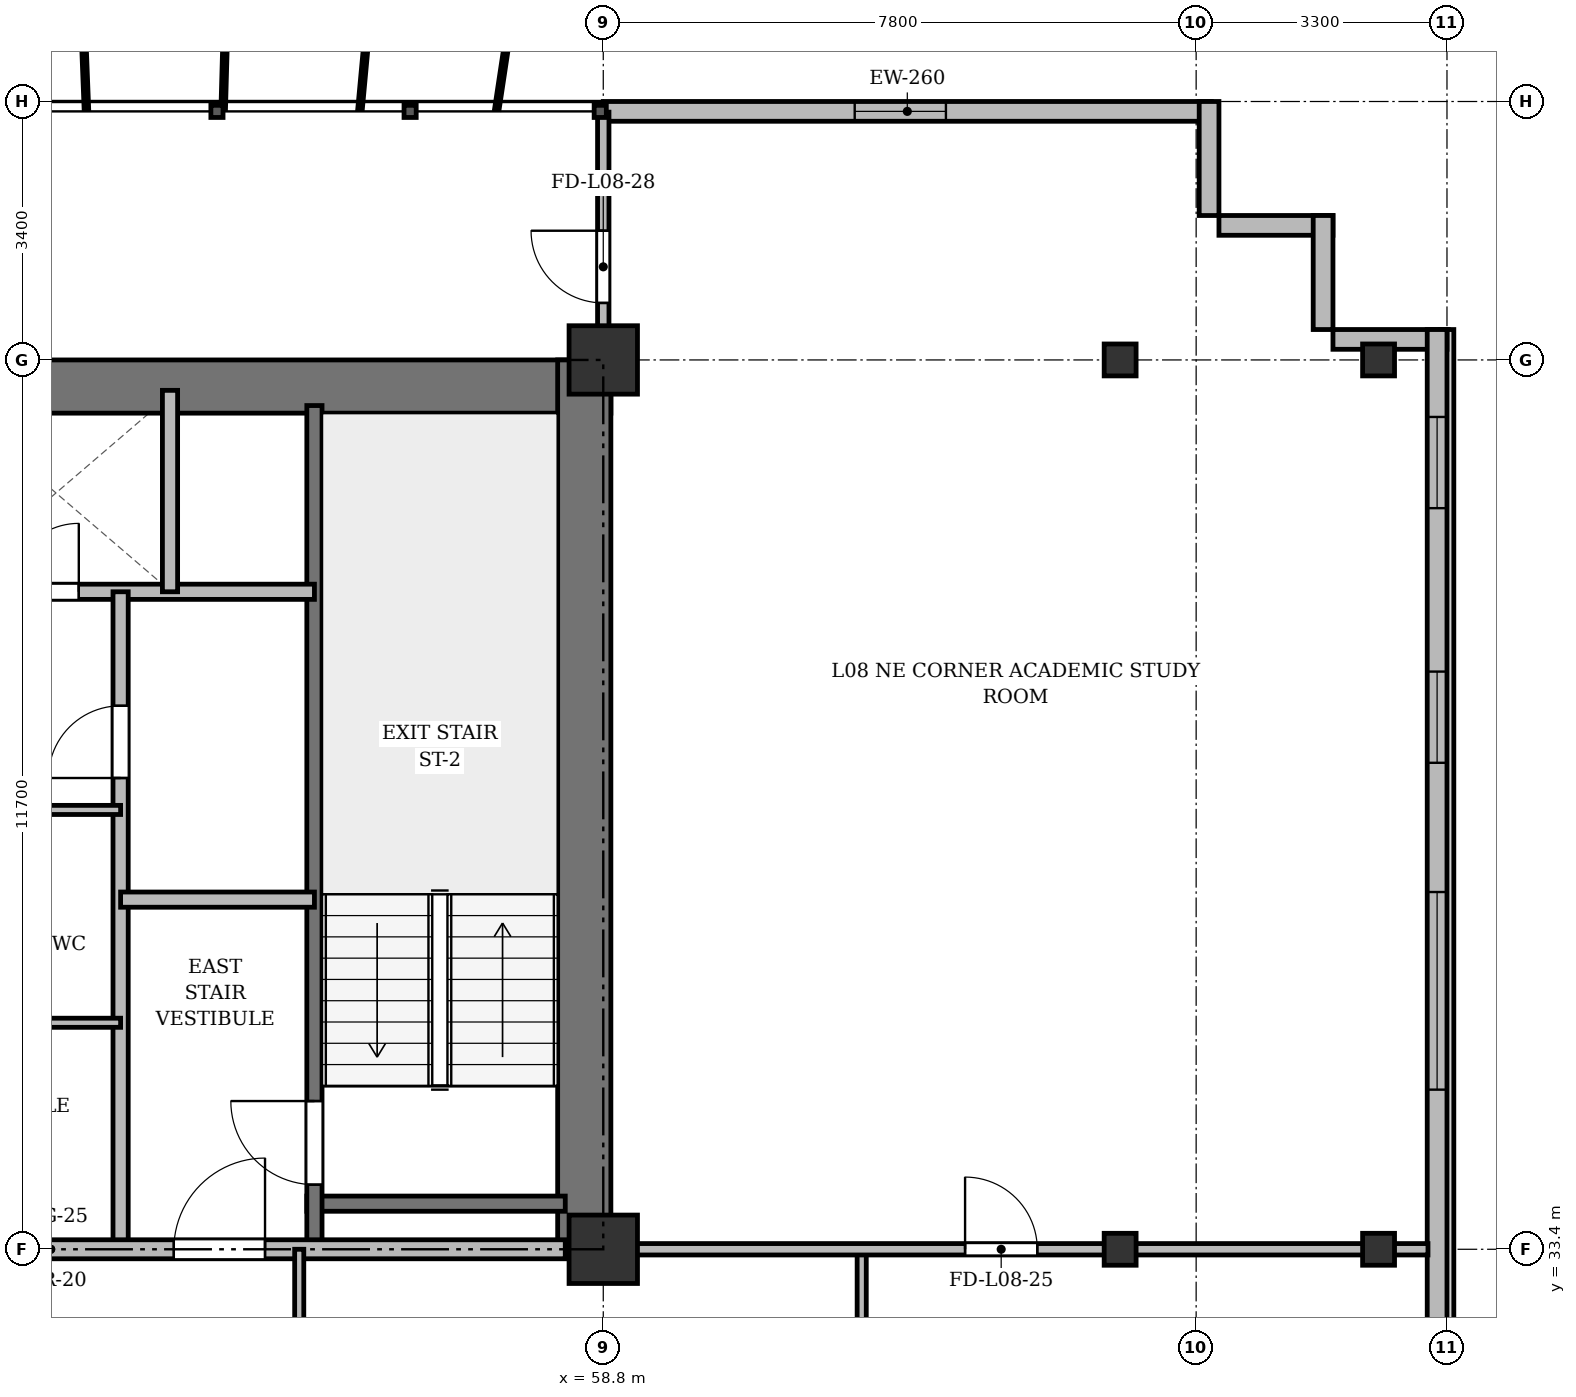
"""IFC4 building model, lengths in metres.
Left out: names, types, materials, properties, quantities, classifications, styles, units other than length and angle.
Written with IfcOpenShell. Run it as: python <this file> out.ifc"""

import sys

from ifc_helpers import new_model, si_unit, direction, frame, frame_2d, origin, origin_2d, place, context, subcontext, project, spatial, rectangle, i_section, extrude, source, transform, mapped, element, fill, save


model = new_model("IFC4")
c1 = context("Model", 3, precision=1e-05, world=origin(), true_north=direction((0.0, 1.0)))
c2 = subcontext(c1, "Body", "Model", "MODEL_VIEW")
j1 = project(units=[si_unit("LENGTHUNIT", "METRE"), si_unit("PLANEANGLEUNIT", "RADIAN")], contexts=[c1])
p1 = place(None, origin())
s1 = spatial("IfcSite", under=j1, at=p1, CompositionType="ELEMENT")
p2 = place(p1, origin())
s2 = spatial("IfcBuilding", under=s1, at=p2, CompositionType="ELEMENT")
p3 = place(p2, frame((0.0, 0.0, 34.3)))
s3 = spatial("IfcBuildingStorey", under=s2, at=p3, CompositionType="ELEMENT", Elevation=34.3)
m1 = source(origin(), c2, "Body", "SweptSolid", [
    extrude(rectangle(XDim=0.9, YDim=0.9, at=origin_2d()), origin(), (0.0, 0.0, 1.0), 3.6),
])
for number, where, z_axis, x_axis in (
    (1, (58.8, 33.4, 0.0), (0.0, 0.0, 1.0), (1.0, 0.0, 0.0)),
    (2, (58.8, 45.1, 0.0), (0.0, 0.0, 1.0), (1.0, 0.0, 0.0)),
):
    element("IfcColumn", number, at=place(p3, frame(where, z_axis=z_axis, x_axis=x_axis)), inside=s3, PredefinedType="COLUMN", context=c2, shape_type="MappedRepresentation", body=[
        mapped(m1, transform((0.0, 0.0, 0.0), x_axis=(1.0, 0.0, 0.0), y_axis=(0.0, 1.0, 0.0), z_axis=(0.0, 0.0, 1.0), scale=1.0)),
    ])
m2 = source(origin(), c2, "Body", "SweptSolid", [
    extrude(i_section(OverallWidth=0.42, OverallDepth=0.42, WebThickness=0.026, FlangeThickness=0.04, at=origin_2d()), origin(), (0.0, 0.0, 1.0), 3.6),
])
for number, where, z_axis, x_axis in (
    (3, (65.6, 33.4, 0.0), (0.0, 0.0, 1.0), (1.0, 0.0, 0.0)),
    (4, (65.6, 45.1, 0.0), (0.0, 0.0, 1.0), (1.0, 0.0, 0.0)),
    (5, (69.0, 33.4, 0.0), (0.0, 0.0, 1.0), (1.0, 0.0, 0.0)),
    (6, (69.0, 45.1, 0.0), (0.0, 0.0, 1.0), (1.0, 0.0, 0.0)),
):
    element("IfcColumn", number, at=place(p3, frame(where, z_axis=z_axis, x_axis=x_axis)), inside=s3, PredefinedType="COLUMN", context=c2, shape_type="MappedRepresentation", body=[
        mapped(m2, transform((0.0, 0.0, 0.0), x_axis=(1.0, 0.0, 0.0), y_axis=(0.0, 1.0, 0.0), z_axis=(0.0, 0.0, 1.0), scale=1.0)),
    ])
p4 = place(p3, frame((58.8, 48.37, 0.0), z_axis=(0.0, 0.0, 1.0), x_axis=(1.0, 0.0, 0.0)))
e7 = element("IfcWall", 7, at=p4, inside=s3, PredefinedType="SOLIDWALL", context=c2, shape_type="SweptSolid", body=[
    extrude(rectangle(XDim=8.0, YDim=0.26, at=frame_2d((4.0, 0.0))), origin(), (0.0, 0.0, 1.0), 3.34),
])
p5 = place(p4, frame((3.308, 0.0, 0.9)))
e8 = element("IfcOpeningElement", 8, at=p5, cuts=e7, PredefinedType="OPENING", context=c2, shape_type="SweptSolid", body=[
    extrude(rectangle(XDim=1.2, YDim=1.65, at=frame_2d((0.6, 0.825))), frame((0.0, 0.14, 0.0), z_axis=(0.0, -1.0, 0.0), x_axis=(1.0, 0.0, 0.0)), (0.0, 0.0, 1.0), 0.28),
])
for number, where, z_axis, x_axis in (
    (9, (66.77, 48.5, 0.0), (0.0, 0.0, 1.0), (0.0, -1.0, 0.0)),
    (10, (66.9, 46.87, 0.0), (0.0, 0.0, 1.0), (1.0, 0.0, 0.0)),
    (11, (68.27, 47.0, 0.0), (0.0, 0.0, 1.0), (0.0, -1.0, 0.0)),
):
    element("IfcWall", number, at=place(p3, frame(where, z_axis=z_axis, x_axis=x_axis)), inside=s3, PredefinedType="SOLIDWALL", context=c2, shape_type="SweptSolid", body=[
        extrude(rectangle(XDim=1.5, YDim=0.26, at=frame_2d((0.75, 0.0))), origin(), (0.0, 0.0, 1.0), 3.34),
    ])
p6 = place(p3, frame((68.4, 45.37, 0.0), z_axis=(0.0, 0.0, 1.0), x_axis=(1.0, 0.0, 0.0)))
e12 = element("IfcWall", 12, at=p6, inside=s3, PredefinedType="SOLIDWALL", context=c2, shape_type="SweptSolid", body=[
    extrude(rectangle(XDim=1.5, YDim=0.26, at=frame_2d((0.75, 0.0))), origin(), (0.0, 0.0, 1.0), 2.69),
])
p7 = place(p3, frame((69.77, 45.5, 0.0), z_axis=(0.0, 0.0, 1.0), x_axis=(0.0, -1.0, 0.0)))
e13 = element("IfcWall", 13, at=p7, inside=s3, PredefinedType="SOLIDWALL", context=c2, shape_type="SweptSolid", body=[
    extrude(rectangle(XDim=39.6, YDim=0.26, at=frame_2d((19.8, 0.0))), origin(), (0.0, 0.0, 1.0), 3.34),
])
p8 = place(p7, frame((36.95, 0.0, 0.92)))
e14 = element("IfcOpeningElement", 14, at=p8, cuts=e13, PredefinedType="OPENING", context=c2, shape_type="SweptSolid", body=[
    extrude(rectangle(XDim=1.2, YDim=1.65, at=frame_2d((0.6, 0.825))), frame((0.0, 0.14, 0.0), z_axis=(0.0, -1.0, 0.0), x_axis=(1.0, 0.0, 0.0)), (0.0, 0.0, 1.0), 0.28),
])
p9 = place(p7, frame((32.8, 0.0, 0.92)))
e15 = element("IfcOpeningElement", 15, at=p9, cuts=e13, PredefinedType="OPENING", context=c2, shape_type="SweptSolid", body=[
    extrude(rectangle(XDim=2.6, YDim=1.9, at=frame_2d((1.3, 0.95))), frame((0.0, 0.14, 0.0), z_axis=(0.0, -1.0, 0.0), x_axis=(1.0, 0.0, 0.0)), (0.0, 0.0, 1.0), 0.28),
])
p10 = place(p7, frame((28.6, 0.0, 0.92)))
e16 = element("IfcOpeningElement", 16, at=p10, cuts=e13, PredefinedType="OPENING", context=c2, shape_type="SweptSolid", body=[
    extrude(rectangle(XDim=2.6, YDim=1.9, at=frame_2d((1.3, 0.95))), frame((0.0, 0.14, 0.0), z_axis=(0.0, -1.0, 0.0), x_axis=(1.0, 0.0, 0.0)), (0.0, 0.0, 1.0), 0.28),
])
p11 = place(p7, frame((7.4, 0.0, 0.92)))
e17 = element("IfcOpeningElement", 17, at=p11, cuts=e13, PredefinedType="OPENING", context=c2, shape_type="SweptSolid", body=[
    extrude(rectangle(XDim=2.6, YDim=1.9, at=frame_2d((1.3, 0.95))), frame((0.0, 0.14, 0.0), z_axis=(0.0, -1.0, 0.0), x_axis=(1.0, 0.0, 0.0)), (0.0, 0.0, 1.0), 0.28),
])
p12 = place(p7, frame((4.5, 0.0, 0.92)))
e18 = element("IfcOpeningElement", 18, at=p12, cuts=e13, PredefinedType="OPENING", context=c2, shape_type="SweptSolid", body=[
    extrude(rectangle(XDim=1.2, YDim=1.65, at=frame_2d((0.6, 0.825))), frame((0.0, 0.14, 0.0), z_axis=(0.0, -1.0, 0.0), x_axis=(1.0, 0.0, 0.0)), (0.0, 0.0, 1.0), 0.28),
])
p13 = place(p7, frame((1.15, 0.0, 0.92)))
e19 = element("IfcOpeningElement", 19, at=p13, cuts=e13, PredefinedType="OPENING", context=c2, shape_type="SweptSolid", body=[
    extrude(rectangle(XDim=1.2, YDim=1.65, at=frame_2d((0.6, 0.825))), frame((0.0, 0.14, 0.0), z_axis=(0.0, -1.0, 0.0), x_axis=(1.0, 0.0, 0.0)), (0.0, 0.0, 1.0), 0.28),
])
p14 = place(p3, frame((15.5, 44.75, 0.0), z_axis=(0.0, 0.0, 1.0), x_axis=(1.0, 0.0, 0.0)))
e20 = element("IfcWall", 20, at=p14, inside=s3, PredefinedType="SHEAR", context=c2, shape_type="SweptSolid", body=[
    extrude(rectangle(XDim=43.4, YDim=0.7, at=frame_2d((21.7, 0.0))), origin(), (0.0, 0.0, 1.0), 3.34),
])
p15 = place(p3, frame((58.55, 33.4, 0.0), z_axis=(0.0, 0.0, 1.0), x_axis=(0.0, 1.0, 0.0)))
e21 = element("IfcWall", 21, at=p15, inside=s3, PredefinedType="SHEAR", context=c2, shape_type="SweptSolid", body=[
    extrude(rectangle(XDim=11.7, YDim=0.7, at=frame_2d((5.85, 0.0))), origin(), (0.0, 0.0, 1.0), 3.34),
])
p16 = place(p3, frame((54.9, 34.0, 0.0), z_axis=(0.0, 0.0, 1.0), x_axis=(1.0, 0.0, 0.0)))
e22 = element("IfcWall", 22, at=p16, inside=s3, PredefinedType="SHEAR", context=c2, shape_type="SweptSolid", body=[
    extrude(rectangle(XDim=3.4, YDim=0.2, at=frame_2d((1.7, 0.0))), origin(), (0.0, 0.0, 1.0), 3.34),
])
p17 = place(p3, frame((55.0, 33.4, 0.0), z_axis=(0.0, 0.0, 1.0), x_axis=(0.0, 1.0, 0.0)))
e23 = element("IfcWall", 23, at=p17, inside=s3, PredefinedType="SHEAR", context=c2, shape_type="SweptSolid", body=[
    extrude(rectangle(XDim=11.1, YDim=0.2, at=frame_2d((5.55, 0.0))), origin(), (0.0, 0.0, 1.0), 3.34),
])
p18 = place(p17, frame((0.85, 0.0, 0.0)))
e24 = element("IfcOpeningElement", 24, at=p18, cuts=e23, PredefinedType="OPENING", context=c2, shape_type="SweptSolid", body=[
    extrude(rectangle(XDim=1.1, YDim=2.15, at=frame_2d((0.55, 1.075))), frame((0.0, 0.11, 0.0), z_axis=(0.0, -1.0, 0.0), x_axis=(1.0, 0.0, 0.0)), (0.0, 0.0, 1.0), 0.22),
])
p19 = place(p3, frame((47.15, 42.05, 0.0), z_axis=(0.0, 0.0, 1.0), x_axis=(1.0, 0.0, 0.0)))
e25 = element("IfcWall", 25, at=p19, inside=s3, PredefinedType="SOLIDWALL", context=c2, shape_type="SweptSolid", body=[
    extrude(rectangle(XDim=7.85, YDim=0.2, at=frame_2d((3.925, 0.0))), origin(), (0.0, 0.0, 1.0), 2.752),
])
p20 = place(p19, frame((0.75, 0.0, 0.0)))
e26 = element("IfcOpeningElement", 26, at=p20, cuts=e25, PredefinedType="OPENING", context=c2, shape_type="SweptSolid", body=[
    extrude(rectangle(XDim=0.9, YDim=2.1, at=frame_2d((0.45, 1.05))), frame((0.0, 0.11, 0.0), z_axis=(0.0, -1.0, 0.0), x_axis=(1.0, 0.0, 0.0)), (0.0, 0.0, 1.0), 0.22),
])
p21 = place(p19, frame((3.85, 0.0, 0.0)))
e27 = element("IfcOpeningElement", 27, at=p21, cuts=e25, PredefinedType="OPENING", context=c2, shape_type="SweptSolid", body=[
    extrude(rectangle(XDim=0.9, YDim=2.1, at=frame_2d((0.45, 1.05))), frame((0.0, 0.11, 0.0), z_axis=(0.0, -1.0, 0.0), x_axis=(1.0, 0.0, 0.0)), (0.0, 0.0, 1.0), 0.22),
])
p22 = place(p3, frame((53.1, 42.05, 0.0), z_axis=(0.0, 0.0, 1.0), x_axis=(0.0, 1.0, 0.0)))
e28 = element("IfcWall", 28, at=p22, inside=s3, PredefinedType="SOLIDWALL", context=c2, shape_type="SweptSolid", body=[
    extrude(rectangle(XDim=2.65, YDim=0.2, at=frame_2d((1.325, 0.0))), origin(), (0.0, 0.0, 1.0), 3.34),
])
p23 = place(p3, frame((52.45, 33.4, 0.0), z_axis=(0.0, 0.0, 1.0), x_axis=(0.0, 1.0, 0.0)))
e29 = element("IfcWall", 29, at=p23, inside=s3, PredefinedType="PARTITIONING", context=c2, shape_type="SweptSolid", body=[
    extrude(rectangle(XDim=8.65, YDim=0.2, at=frame_2d((4.325, 0.0))), origin(), (0.0, 0.0, 1.0), 2.69),
])
p24 = place(p23, frame((6.2, 0.0, 0.0)))
e30 = element("IfcOpeningElement", 30, at=p24, cuts=e29, PredefinedType="OPENING", context=c2, shape_type="SweptSolid", body=[
    extrude(rectangle(XDim=0.95, YDim=2.15, at=frame_2d((0.475, 1.075))), frame((0.0, 0.11, 0.0), z_axis=(0.0, -1.0, 0.0), x_axis=(1.0, 0.0, 0.0)), (0.0, 0.0, 1.0), 0.22),
])
p25 = place(p3, frame((52.45, 38.0, 0.0), z_axis=(0.0, 0.0, 1.0), x_axis=(1.0, 0.0, 0.0)))
e31 = element("IfcWall", 31, at=p25, inside=s3, PredefinedType="PARTITIONING", context=c2, shape_type="SweptSolid", body=[
    extrude(rectangle(XDim=2.55, YDim=0.2, at=frame_2d((1.275, 0.0))), origin(), (0.0, 0.0, 1.0), 3.34),
])
for number, where, z_axis, x_axis in (
    (32, (49.32, 36.38, 0.0), (0.0, 0.0, 1.0), (1.0, 0.0, 0.0)),
    (33, (49.32, 39.18, 0.0), (0.0, 0.0, 1.0), (1.0, 0.0, 0.0)),
):
    element("IfcWall", number, at=place(p3, frame(where, z_axis=z_axis, x_axis=x_axis)), inside=s3, PredefinedType="PARTITIONING", context=c2, shape_type="SweptSolid", body=[
        extrude(rectangle(XDim=3.13, YDim=0.12, at=frame_2d((1.565, 0.0))), origin(), (0.0, 0.0, 1.0), 2.752),
    ])
p26 = place(p3, frame((47.15, 33.4, 0.0), z_axis=(0.0, 0.0, 1.0), x_axis=(1.0, 0.0, 0.0)))
e34 = element("IfcWall", 34, at=p26, inside=s3, PredefinedType="PARTITIONING", context=c2, shape_type="SweptSolid", body=[
    extrude(rectangle(XDim=11.15, YDim=0.25, at=frame_2d((5.575, 0.0))), origin(), (0.0, 0.0, 1.0), 2.69),
])
p27 = place(p26, frame((0.7, 0.0, 0.0)))
e35 = element("IfcOpeningElement", 35, at=p27, cuts=e34, PredefinedType="OPENING", context=c2, shape_type="SweptSolid", body=[
    extrude(rectangle(XDim=0.95, YDim=2.15, at=frame_2d((0.475, 1.075))), frame((0.0, 0.135, 0.0), z_axis=(0.0, -1.0, 0.0), x_axis=(1.0, 0.0, 0.0)), (0.0, 0.0, 1.0), 0.27),
])
p28 = place(p26, frame((6.0, 0.0, 0.0)))
e36 = element("IfcOpeningElement", 36, at=p28, cuts=e34, PredefinedType="OPENING", context=c2, shape_type="SweptSolid", body=[
    extrude(rectangle(XDim=1.2, YDim=2.15, at=frame_2d((0.6, 1.075))), frame((0.0, 0.135, 0.0), z_axis=(0.0, -1.0, 0.0), x_axis=(1.0, 0.0, 0.0)), (0.0, 0.0, 1.0), 0.27),
])
for number, where, z_axis, x_axis in (
    (37, (62.2, 29.8, 0.0), (0.0, 0.0, 1.0), (0.0, 1.0, 0.0)),
    (38, (54.8, 29.8, 0.0), (0.0, 0.0, 1.0), (0.0, 1.0, 0.0)),
):
    element("IfcWall", number, at=place(p3, frame(where, z_axis=z_axis, x_axis=x_axis)), inside=s3, PredefinedType="PARTITIONING", context=c2, shape_type="SweptSolid", body=[
        extrude(rectangle(XDim=3.6, YDim=0.12, at=frame_2d((1.8, 0.0))), origin(), (0.0, 0.0, 1.0), 2.69),
    ])
p29 = place(p3, frame((58.8, 33.4, 0.0), z_axis=(0.0, 0.0, 1.0), x_axis=(1.0, 0.0, 0.0)))
e39 = element("IfcWall", 39, at=p29, inside=s3, PredefinedType="PARTITIONING", context=c2, shape_type="SweptSolid", body=[
    extrude(rectangle(XDim=10.85, YDim=0.15, at=frame_2d((5.425, 0.0))), origin(), (0.0, 0.0, 1.0), 2.69),
])
p30 = place(p29, frame((4.76, 0.0, 0.0)))
e40 = element("IfcOpeningElement", 40, at=p30, cuts=e39, PredefinedType="OPENING", context=c2, shape_type="SweptSolid", body=[
    extrude(rectangle(XDim=0.95, YDim=2.15, at=frame_2d((0.475, 1.075))), frame((0.0, 0.085, 0.0), z_axis=(0.0, -1.0, 0.0), x_axis=(1.0, 0.0, 0.0)), (0.0, 0.0, 1.0), 0.17),
])
p31 = place(p3, frame((58.8, 44.75, 0.0), z_axis=(0.0, 0.0, 1.0), x_axis=(0.0, 1.0, 0.0)))
e41 = element("IfcWall", 41, at=p31, inside=s3, PredefinedType="PARTITIONING", context=c2, shape_type="SweptSolid", body=[
    extrude(rectangle(XDim=3.61, YDim=0.15, at=frame_2d((1.805, 0.0))), origin(), (0.0, 0.0, 1.0), 2.752),
])
p32 = place(p31, frame((1.1, 0.0, 0.0)))
e42 = element("IfcOpeningElement", 42, at=p32, cuts=e41, PredefinedType="OPENING", context=c2, shape_type="SweptSolid", body=[
    extrude(rectangle(XDim=0.95, YDim=2.15, at=frame_2d((0.475, 1.075))), frame((0.0, 0.085, 0.0), z_axis=(0.0, -1.0, 0.0), x_axis=(1.0, 0.0, 0.0)), (0.0, 0.0, 1.0), 0.17),
])
m3 = source(origin(), c2, "Body", "SweptSolid", [
    extrude(rectangle(XDim=1.2, YDim=1.65, at=frame_2d((0.6, 0.825))), frame((0.0, 0.03, 0.0), z_axis=(0.0, -1.0, 0.0), x_axis=(1.0, 0.0, 0.0)), (0.0, 0.0, 1.0), 0.06),
])
p33 = place(p5, origin())
e43 = element("IfcWindow", 43, at=p33, inside=s3, PartitioningType="SINGLE_PANEL", PredefinedType="WINDOW", context=c2, shape_type="MappedRepresentation", body=[
    mapped(m3, transform((0.0, 0.0, 0.0), x_axis=(1.0, 0.0, 0.0), y_axis=(0.0, 1.0, 0.0), z_axis=(0.0, 0.0, 1.0), scale=1.0)),
])
fill(e8, e43)
m4 = source(origin(), c2, "Body", "SweptSolid", [
    extrude(rectangle(XDim=2.6, YDim=1.9, at=frame_2d((1.3, 0.95))), frame((0.0, 0.03, 0.0), z_axis=(0.0, -1.0, 0.0), x_axis=(1.0, 0.0, 0.0)), (0.0, 0.0, 1.0), 0.06),
])
p34 = place(p11, origin())
e44 = element("IfcWindow", 44, at=p34, inside=s3, PartitioningType="SINGLE_PANEL", PredefinedType="WINDOW", context=c2, shape_type="MappedRepresentation", body=[
    mapped(m4, transform((0.0, 0.0, 0.0), x_axis=(1.0, 0.0, 0.0), y_axis=(0.0, 1.0, 0.0), z_axis=(0.0, 0.0, 1.0), scale=1.0)),
])
fill(e17, e44)
p35 = place(p12, origin())
e45 = element("IfcWindow", 45, at=p35, inside=s3, PartitioningType="SINGLE_PANEL", PredefinedType="WINDOW", context=c2, shape_type="MappedRepresentation", body=[
    mapped(m3, transform((0.0, 0.0, 0.0), x_axis=(1.0, 0.0, 0.0), y_axis=(0.0, 1.0, 0.0), z_axis=(0.0, 0.0, 1.0), scale=1.0)),
])
fill(e18, e45)
p36 = place(p13, origin())
e46 = element("IfcWindow", 46, at=p36, inside=s3, PartitioningType="SINGLE_PANEL", PredefinedType="WINDOW", context=c2, shape_type="MappedRepresentation", body=[
    mapped(m3, transform((0.0, 0.0, 0.0), x_axis=(1.0, 0.0, 0.0), y_axis=(0.0, 1.0, 0.0), z_axis=(0.0, 0.0, 1.0), scale=1.0)),
])
fill(e19, e46)
m5 = source(origin(), c2, "Body", "SweptSolid", [
    extrude(rectangle(XDim=1.1, YDim=2.15, at=frame_2d((0.55, 1.075))), frame((0.0, 0.025, 0.0), z_axis=(0.0, -1.0, 0.0), x_axis=(1.0, 0.0, 0.0)), (0.0, 0.0, 1.0), 0.05),
])
p37 = place(p18, origin())
e47 = element("IfcDoor", 47, at=p37, inside=s3, OperationType="SINGLE_SWING_RIGHT", PredefinedType="DOOR", context=c2, shape_type="MappedRepresentation", body=[
    mapped(m5, transform((0.0, 0.0, 0.0), x_axis=(1.0, 0.0, 0.0), y_axis=(0.0, 1.0, 0.0), z_axis=(0.0, 0.0, 1.0), scale=1.0)),
])
fill(e24, e47)
m6 = source(origin(), c2, "Body", "SweptSolid", [
    extrude(rectangle(XDim=0.9, YDim=2.1, at=frame_2d((0.45, 1.05))), frame((0.0, 0.025, 0.0), z_axis=(0.0, -1.0, 0.0), x_axis=(1.0, 0.0, 0.0)), (0.0, 0.0, 1.0), 0.05),
])
p38 = place(p21, origin())
e48 = element("IfcDoor", 48, at=p38, inside=s3, OperationType="SINGLE_SWING_RIGHT", PredefinedType="DOOR", context=c2, shape_type="MappedRepresentation", body=[
    mapped(m6, transform((0.0, 0.0, 0.0), x_axis=(1.0, 0.0, 0.0), y_axis=(0.0, 1.0, 0.0), z_axis=(0.0, 0.0, 1.0), scale=1.0)),
])
fill(e27, e48)
m7 = source(origin(), c2, "Body", "SweptSolid", [
    extrude(rectangle(XDim=0.95, YDim=2.15, at=frame_2d((0.475, 1.075))), frame((0.0, 0.025, 0.0), z_axis=(0.0, -1.0, 0.0), x_axis=(1.0, 0.0, 0.0)), (0.0, 0.0, 1.0), 0.05),
])
p39 = place(p24, origin())
e49 = element("IfcDoor", 49, at=p39, inside=s3, OperationType="SINGLE_SWING_LEFT", PredefinedType="DOOR", context=c2, shape_type="MappedRepresentation", body=[
    mapped(m7, transform((0.0, 0.0, 0.0), x_axis=(1.0, 0.0, 0.0), y_axis=(0.0, 1.0, 0.0), z_axis=(0.0, 0.0, 1.0), scale=1.0)),
])
fill(e30, e49)
m8 = source(origin(), c2, "Body", "SweptSolid", [
    extrude(rectangle(XDim=1.2, YDim=2.15, at=frame_2d((0.6, 1.075))), frame((0.0, 0.025, 0.0), z_axis=(0.0, -1.0, 0.0), x_axis=(1.0, 0.0, 0.0)), (0.0, 0.0, 1.0), 0.05),
])
p40 = place(p28, origin())
e50 = element("IfcDoor", 50, at=p40, inside=s3, OperationType="SINGLE_SWING_RIGHT", PredefinedType="DOOR", context=c2, shape_type="MappedRepresentation", body=[
    mapped(m8, transform((0.0, 0.0, 0.0), x_axis=(1.0, 0.0, 0.0), y_axis=(0.0, 1.0, 0.0), z_axis=(0.0, 0.0, 1.0), scale=1.0)),
])
fill(e36, e50)
p41 = place(p30, origin())
e51 = element("IfcDoor", 51, at=p41, inside=s3, OperationType="SINGLE_SWING_LEFT", PredefinedType="DOOR", context=c2, shape_type="MappedRepresentation", body=[
    mapped(m7, transform((0.0, 0.0, 0.0), x_axis=(1.0, 0.0, 0.0), y_axis=(0.0, 1.0, 0.0), z_axis=(0.0, 0.0, 1.0), scale=1.0)),
])
fill(e40, e51)
p42 = place(p32, origin())
e52 = element("IfcDoor", 52, at=p42, inside=s3, OperationType="SINGLE_SWING_RIGHT", PredefinedType="DOOR", context=c2, shape_type="MappedRepresentation", body=[
    mapped(m7, transform((0.0, 0.0, 0.0), x_axis=(1.0, 0.0, 0.0), y_axis=(0.0, 1.0, 0.0), z_axis=(0.0, 0.0, 1.0), scale=1.0)),
])
fill(e42, e52)
save(model, sys.argv[1])
